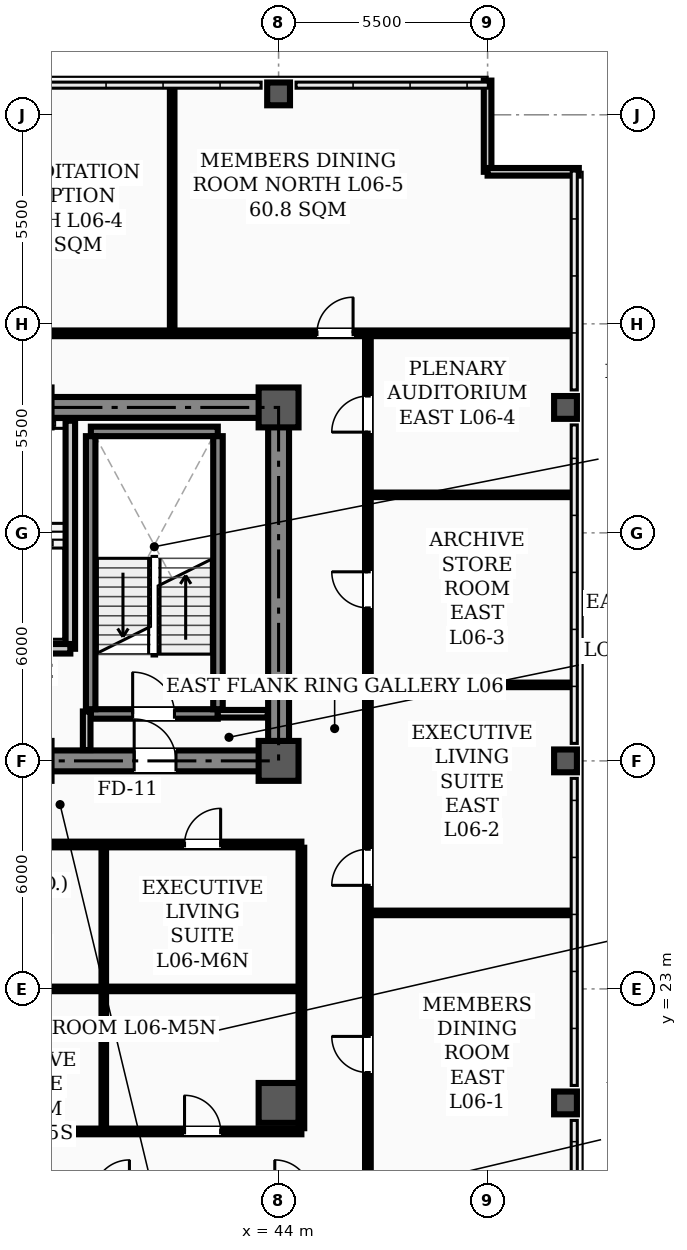
"""IFC4 building model, lengths in metres.
Left out: names, types, materials, properties, quantities, classifications, styles, units other than length and angle.
Written with IfcOpenShell. Run it as: python <this file> out.ifc"""

import sys

from ifc_helpers import new_model, si_unit, direction, frame, frame_2d, origin, origin_2d, place, context, subcontext, project, spatial, rectangle, hollow_rectangle, extrude, element, fill, save


model = new_model("IFC4")
c1 = context("Model", 3, precision=1e-05, world=origin(), true_north=direction((0.0, 1.0)))
c2 = subcontext(c1, "Body", "Model", "MODEL_VIEW")
j1 = project(units=[si_unit("LENGTHUNIT", "METRE"), si_unit("PLANEANGLEUNIT", "RADIAN")], contexts=[c1])
p1 = place(None, origin())
s1 = spatial("IfcSite", under=j1, at=p1, CompositionType="ELEMENT")
p2 = place(p1, origin())
s2 = spatial("IfcBuilding", under=s1, at=p2, CompositionType="ELEMENT")
p3 = place(p2, frame((0.0, 0.0, 26.5)))
s3 = spatial("IfcBuildingStorey", under=s2, at=p3, CompositionType="ELEMENT", Elevation=26.5)
for number, where, z_axis, x_axis in (
    (1, (44.0, 29.0, 0.0), (0.0, 0.0, 1.0), (1.0, 0.0, 0.0)),
    (2, (44.0, 38.3, 0.0), (0.0, 0.0, 1.0), (1.0, 0.0, 0.0)),
    (3, (44.0, 20.0, 0.0), (0.0, 0.0, 1.0), (1.0, 0.0, 0.0)),
):
    element("IfcColumn", number, at=place(p3, frame(where, z_axis=z_axis, x_axis=x_axis)), inside=s3, PredefinedType="COLUMN", context=c2, shape_type="SweptSolid", body=[
        extrude(hollow_rectangle(XDim=1.05, YDim=1.05, WallThickness=0.038, InnerFilletRadius=0.019, OuterFilletRadius=0.057, at=origin_2d()), origin(), (0.0, 0.0, 1.0), 3.9),
    ])
for number, where, z_axis, x_axis in (
    (4, (44.0, 46.55, 0.0), (0.0, 0.0, 1.0), (1.0, 0.0, 0.0)),
    (5, (51.55, 20.0, 0.0), (0.0, 0.0, 1.0), (1.0, 0.0, 0.0)),
    (6, (51.55, 29.0, 0.0), (0.0, 0.0, 1.0), (1.0, 0.0, 0.0)),
    (7, (51.55, 38.3, 0.0), (0.0, 0.0, 1.0), (1.0, 0.0, 0.0)),
):
    element("IfcColumn", number, at=place(p3, frame(where, z_axis=z_axis, x_axis=x_axis)), inside=s3, PredefinedType="COLUMN", context=c2, shape_type="SweptSolid", body=[
        extrude(hollow_rectangle(XDim=0.6, YDim=0.6, WallThickness=0.026, InnerFilletRadius=0.013, OuterFilletRadius=0.039, at=origin_2d()), origin(), (0.0, 0.0, 1.0), 3.9),
    ])
for number, where, z_axis, x_axis in (
    (8, (49.5, 46.9, 0.0), (0.0, 0.0, 1.0), (0.0, -1.0, 0.0)),
    (9, (49.5, 44.5, 0.0), (0.0, 0.0, 1.0), (1.0, 0.0, 0.0)),
):
    element("IfcWall", number, at=place(p3, frame(where, z_axis=z_axis, x_axis=x_axis)), inside=s3, PredefinedType="PARAPET", context=c2, shape_type="SweptSolid", body=[
        extrude(rectangle(XDim=2.4, YDim=0.2, at=frame_2d((1.2, 0.0))), origin(), (0.0, 0.0, 1.0), 1.2),
    ])
p4 = place(p3, frame((13.5, 29.0, 0.0), z_axis=(0.0, 0.0, 1.0), x_axis=(1.0, 0.0, 0.0)))
e10 = element("IfcWall", 10, at=p4, inside=s3, PredefinedType="SHEAR", context=c2, shape_type="SweptSolid", body=[
    extrude(rectangle(XDim=30.5, YDim=0.55, at=frame_2d((15.25, 0.0))), origin(), (0.0, 0.0, 1.0), 3.72),
])
p5 = place(p4, frame((1.75, 0.0, 0.0)))
e11 = element("IfcOpeningElement", 11, at=p5, cuts=e10, PredefinedType="OPENING", context=c2, shape_type="SweptSolid", body=[
    extrude(rectangle(XDim=1.1, YDim=2.08, at=frame_2d((0.55, 1.04))), frame((0.0, 0.285, 0.0), z_axis=(0.0, -1.0, 0.0), x_axis=(1.0, 0.0, 0.0)), (0.0, 0.0, 1.0), 0.57),
])
p6 = place(p4, frame((26.7, 0.0, 0.0)))
e12 = element("IfcOpeningElement", 12, at=p6, cuts=e10, PredefinedType="OPENING", context=c2, shape_type="SweptSolid", body=[
    extrude(rectangle(XDim=1.1, YDim=2.08, at=frame_2d((0.55, 1.04))), frame((0.0, 0.285, 0.0), z_axis=(0.0, -1.0, 0.0), x_axis=(1.0, 0.0, 0.0)), (0.0, 0.0, 1.0), 0.57),
])
p7 = place(p4, frame((6.8, 0.0, 0.0)))
e13 = element("IfcOpeningElement", 13, at=p7, cuts=e10, PredefinedType="OPENING", context=c2, shape_type="SweptSolid", body=[
    extrude(rectangle(XDim=1.1, YDim=2.08, at=frame_2d((0.55, 1.04))), frame((0.0, 0.285, 0.0), z_axis=(0.0, -1.0, 0.0), x_axis=(1.0, 0.0, 0.0)), (0.0, 0.0, 1.0), 0.57),
])
p8 = place(p4, frame((13.2, 0.0, 0.0)))
e14 = element("IfcOpeningElement", 14, at=p8, cuts=e10, PredefinedType="OPENING", context=c2, shape_type="SweptSolid", body=[
    extrude(rectangle(XDim=1.6, YDim=2.08, at=frame_2d((0.8, 1.04))), frame((0.0, 0.285, 0.0), z_axis=(0.0, -1.0, 0.0), x_axis=(1.0, 0.0, 0.0)), (0.0, 0.0, 1.0), 0.57),
])
p9 = place(p4, frame((20.525, 0.0, 0.0)))
e15 = element("IfcOpeningElement", 15, at=p9, cuts=e10, PredefinedType="OPENING", context=c2, shape_type="SweptSolid", body=[
    extrude(rectangle(XDim=0.95, YDim=2.08, at=frame_2d((0.475, 1.04))), frame((0.0, 0.285, 0.0), z_axis=(0.0, -1.0, 0.0), x_axis=(1.0, 0.0, 0.0)), (0.0, 0.0, 1.0), 0.57),
])
p10 = place(p3, frame((13.5, 38.3, 0.0), z_axis=(0.0, 0.0, 1.0), x_axis=(1.0, 0.0, 0.0)))
e16 = element("IfcWall", 16, at=p10, inside=s3, PredefinedType="SHEAR", context=c2, shape_type="SweptSolid", body=[
    extrude(rectangle(XDim=30.5, YDim=0.55, at=frame_2d((15.25, 0.0))), origin(), (0.0, 0.0, 1.0), 3.72),
])
p11 = place(p3, frame((44.0, 29.35, 0.0), z_axis=(0.0, 0.0, 1.0), x_axis=(0.0, 1.0, 0.0)))
e17 = element("IfcWall", 17, at=p11, inside=s3, PredefinedType="SHEAR", context=c2, shape_type="SweptSolid", body=[
    extrude(rectangle(XDim=8.6, YDim=0.55, at=frame_2d((4.3, 0.0))), origin(), (0.0, 0.0, 1.0), 3.72),
])
p12 = place(p3, frame((39.06, 30.235, 0.0), z_axis=(0.0, 0.0, 1.0), x_axis=(1.0, 0.0, 0.0)))
e18 = element("IfcWall", 18, at=p12, inside=s3, PredefinedType="STANDARD", context=c2, shape_type="SweptSolid", body=[
    extrude(rectangle(XDim=3.34, YDim=0.25, at=frame_2d((1.67, 0.0))), origin(), (0.0, 0.0, 1.0), 3.72),
])
p13 = place(p12, frame((1.1, 0.0, 0.0)))
e19 = element("IfcOpeningElement", 19, at=p13, cuts=e18, PredefinedType="OPENING", context=c2, shape_type="SweptSolid", body=[
    extrude(rectangle(XDim=1.1, YDim=2.08, at=frame_2d((0.55, 1.04))), frame((0.0, 0.135, 0.0), z_axis=(0.0, -1.0, 0.0), x_axis=(1.0, 0.0, 0.0)), (0.0, 0.0, 1.0), 0.27),
])
p14 = place(p3, frame((39.06, 37.669, 0.0), z_axis=(0.0, 0.0, 1.0), x_axis=(1.0, 0.0, 0.0)))
e20 = element("IfcWall", 20, at=p14, inside=s3, PredefinedType="STANDARD", context=c2, shape_type="SweptSolid", body=[
    extrude(rectangle(XDim=3.34, YDim=0.25, at=frame_2d((1.67, 0.0))), origin(), (0.0, 0.0, 1.0), 3.72),
])
for number, where, z_axis, x_axis in (
    (21, (39.055, 30.36, 0.0), (0.0, 0.0, 1.0), (0.0, 1.0, 0.0)),
    (22, (42.405, 30.36, 0.0), (0.0, 0.0, 1.0), (0.0, 1.0, 0.0)),
):
    element("IfcWall", number, at=place(p3, frame(where, z_axis=z_axis, x_axis=x_axis)), inside=s3, PredefinedType="STANDARD", context=c2, shape_type="SweptSolid", body=[
        extrude(rectangle(XDim=7.184, YDim=0.25, at=frame_2d((3.592, 0.0))), origin(), (0.0, 0.0, 1.0), 3.72),
    ])
p15 = place(p3, frame((38.52, 31.95, 0.0), z_axis=(0.0, 0.0, 1.0), x_axis=(0.0, 1.0, 0.0)))
e23 = element("IfcWall", 23, at=p15, inside=s3, PredefinedType="STANDARD", context=c2, shape_type="SweptSolid", body=[
    extrude(rectangle(XDim=6.0, YDim=0.25, at=frame_2d((3.0, 0.0))), origin(), (0.0, 0.0, 1.0), 3.3),
])
p16 = place(p3, frame((36.62, 31.95, 0.0), z_axis=(0.0, 0.0, 1.0), x_axis=(1.0, 0.0, 0.0)))
e24 = element("IfcWall", 24, at=p16, inside=s3, PredefinedType="STANDARD", context=c2, shape_type="SweptSolid", body=[
    extrude(rectangle(XDim=1.9, YDim=0.25, at=frame_2d((0.95, 0.0))), origin(), (0.0, 0.0, 1.0), 3.48),
])
p17 = place(p3, frame((42.4, 30.24, 0.0), z_axis=(0.0, 0.0, 1.0), x_axis=(1.0, 0.0, 0.0)))
e25 = element("IfcWall", 25, at=p17, inside=s3, PredefinedType="STANDARD", context=c2, shape_type="SweptSolid", body=[
    extrude(rectangle(XDim=1.315, YDim=0.2, at=frame_2d((0.658, 0.0))), origin(), (0.0, 0.0, 1.0), 3.1),
])
p18 = place(p3, frame((12.9, 26.8, 0.0), z_axis=(0.0, 0.0, 1.0), x_axis=(1.0, 0.0, 0.0)))
e26 = element("IfcWall", 26, at=p18, inside=s3, PredefinedType="PARTITIONING", context=c2, shape_type="SweptSolid", body=[
    extrude(rectangle(XDim=31.7, YDim=0.15, at=frame_2d((15.85, 0.0))), origin(), (0.0, 0.0, 1.0), 3.1),
])
p19 = place(p18, frame((13.6, 0.0, 0.0)))
e27 = element("IfcOpeningElement", 27, at=p19, cuts=e26, PredefinedType="OPENING", context=c2, shape_type="SweptSolid", body=[
    extrude(rectangle(XDim=1.6, YDim=2.08, at=frame_2d((0.8, 1.04))), frame((0.0, 0.085, 0.0), z_axis=(0.0, -1.0, 0.0), x_axis=(1.0, 0.0, 0.0)), (0.0, 0.0, 1.0), 0.17),
])
p20 = place(p18, frame((1.775, 0.0, 0.0)))
e28 = element("IfcOpeningElement", 28, at=p20, cuts=e26, PredefinedType="OPENING", context=c2, shape_type="SweptSolid", body=[
    extrude(rectangle(XDim=0.95, YDim=2.08, at=frame_2d((0.475, 1.04))), frame((0.0, 0.085, 0.0), z_axis=(0.0, -1.0, 0.0), x_axis=(1.0, 0.0, 0.0)), (0.0, 0.0, 1.0), 0.17),
])
p21 = place(p18, frame((6.225, 0.0, 0.0)))
e29 = element("IfcOpeningElement", 29, at=p21, cuts=e26, PredefinedType="OPENING", context=c2, shape_type="SweptSolid", body=[
    extrude(rectangle(XDim=0.95, YDim=2.08, at=frame_2d((0.475, 1.04))), frame((0.0, 0.085, 0.0), z_axis=(0.0, -1.0, 0.0), x_axis=(1.0, 0.0, 0.0)), (0.0, 0.0, 1.0), 0.17),
])
p22 = place(p18, frame((10.625, 0.0, 0.0)))
e30 = element("IfcOpeningElement", 30, at=p22, cuts=e26, PredefinedType="OPENING", context=c2, shape_type="SweptSolid", body=[
    extrude(rectangle(XDim=0.95, YDim=2.08, at=frame_2d((0.475, 1.04))), frame((0.0, 0.085, 0.0), z_axis=(0.0, -1.0, 0.0), x_axis=(1.0, 0.0, 0.0)), (0.0, 0.0, 1.0), 0.17),
])
p23 = place(p18, frame((16.075, 0.0, 0.0)))
e31 = element("IfcOpeningElement", 31, at=p23, cuts=e26, PredefinedType="OPENING", context=c2, shape_type="SweptSolid", body=[
    extrude(rectangle(XDim=0.95, YDim=2.08, at=frame_2d((0.475, 1.04))), frame((0.0, 0.085, 0.0), z_axis=(0.0, -1.0, 0.0), x_axis=(1.0, 0.0, 0.0)), (0.0, 0.0, 1.0), 0.17),
])
p24 = place(p18, frame((21.925, 0.0, 0.0)))
e32 = element("IfcOpeningElement", 32, at=p24, cuts=e26, PredefinedType="OPENING", context=c2, shape_type="SweptSolid", body=[
    extrude(rectangle(XDim=0.95, YDim=2.08, at=frame_2d((0.475, 1.04))), frame((0.0, 0.085, 0.0), z_axis=(0.0, -1.0, 0.0), x_axis=(1.0, 0.0, 0.0)), (0.0, 0.0, 1.0), 0.17),
])
p25 = place(p18, frame((28.625, 0.0, 0.0)))
e33 = element("IfcOpeningElement", 33, at=p25, cuts=e26, PredefinedType="OPENING", context=c2, shape_type="SweptSolid", body=[
    extrude(rectangle(XDim=0.95, YDim=2.08, at=frame_2d((0.475, 1.04))), frame((0.0, 0.085, 0.0), z_axis=(0.0, -1.0, 0.0), x_axis=(1.0, 0.0, 0.0)), (0.0, 0.0, 1.0), 0.17),
])
p26 = place(p3, frame((28.4, 19.25, 0.0), z_axis=(0.0, 0.0, 1.0), x_axis=(1.0, 0.0, 0.0)))
e34 = element("IfcWall", 34, at=p26, inside=s3, PredefinedType="PARTITIONING", context=c2, shape_type="SweptSolid", body=[
    extrude(rectangle(XDim=16.2, YDim=0.15, at=frame_2d((8.1, 0.0))), origin(), (0.0, 0.0, 1.0), 3.1),
])
p27 = place(p26, frame((0.575, 0.0, 0.0)))
e35 = element("IfcOpeningElement", 35, at=p27, cuts=e34, PredefinedType="OPENING", context=c2, shape_type="SweptSolid", body=[
    extrude(rectangle(XDim=0.95, YDim=2.08, at=frame_2d((0.475, 1.04))), frame((0.0, 0.085, 0.0), z_axis=(0.0, -1.0, 0.0), x_axis=(1.0, 0.0, 0.0)), (0.0, 0.0, 1.0), 0.17),
])
p28 = place(p26, frame((6.425, 0.0, 0.0)))
e36 = element("IfcOpeningElement", 36, at=p28, cuts=e34, PredefinedType="OPENING", context=c2, shape_type="SweptSolid", body=[
    extrude(rectangle(XDim=0.95, YDim=2.08, at=frame_2d((0.475, 1.04))), frame((0.0, 0.085, 0.0), z_axis=(0.0, -1.0, 0.0), x_axis=(1.0, 0.0, 0.0)), (0.0, 0.0, 1.0), 0.17),
])
p29 = place(p26, frame((13.125, 0.0, 0.0)))
e37 = element("IfcOpeningElement", 37, at=p29, cuts=e34, PredefinedType="OPENING", context=c2, shape_type="SweptSolid", body=[
    extrude(rectangle(XDim=0.95, YDim=2.08, at=frame_2d((0.475, 1.04))), frame((0.0, 0.085, 0.0), z_axis=(0.0, -1.0, 0.0), x_axis=(1.0, 0.0, 0.0)), (0.0, 0.0, 1.0), 0.17),
])
p30 = place(p3, frame((33.0, 23.0, 0.0), z_axis=(0.0, 0.0, 1.0), x_axis=(1.0, 0.0, 0.0)))
e38 = element("IfcWall", 38, at=p30, inside=s3, PredefinedType="PARTITIONING", context=c2, shape_type="SweptSolid", body=[
    extrude(rectangle(XDim=6.4, YDim=0.12, at=frame_2d((3.2, 0.0))), origin(), (0.0, 0.0, 1.0), 3.1),
])
p31 = place(p3, frame((39.4, 23.0, 0.0), z_axis=(0.0, 0.0, 1.0), x_axis=(1.0, 0.0, 0.0)))
e39 = element("IfcWall", 39, at=p31, inside=s3, PredefinedType="PARTITIONING", context=c2, shape_type="SweptSolid", body=[
    extrude(rectangle(XDim=5.2, YDim=0.12, at=frame_2d((2.6, 0.0))), origin(), (0.0, 0.0, 1.0), 3.1),
])
for number, where, z_axis, x_axis in (
    (40, (46.35, 25.0, 0.0), (0.0, 0.0, 1.0), (1.0, 0.0, 0.0)),
    (41, (46.35, 31.0, 0.0), (0.0, 0.0, 1.0), (1.0, 0.0, 0.0)),
    (42, (46.35, 36.0, 0.0), (0.0, 0.0, 1.0), (1.0, 0.0, 0.0)),
):
    element("IfcWall", number, at=place(p3, frame(where, z_axis=z_axis, x_axis=x_axis)), inside=s3, PredefinedType="PARTITIONING", context=c2, shape_type="SweptSolid", body=[
        extrude(rectangle(XDim=5.34, YDim=0.12, at=frame_2d((2.67, 0.0))), origin(), (0.0, 0.0, 1.0), 3.212),
    ])
p32 = place(p3, frame((2.31, 40.25, 0.0), z_axis=(0.0, 0.0, 1.0), x_axis=(1.0, 0.0, 0.0)))
e43 = element("IfcWall", 43, at=p32, inside=s3, PredefinedType="PARTITIONING", context=c2, shape_type="SweptSolid", body=[
    extrude(rectangle(XDim=49.38, YDim=0.15, at=frame_2d((24.69, 0.0))), origin(), (0.0, 0.0, 1.0), 3.1),
])
p33 = place(p32, frame((9.23, 0.0, 0.0)))
e44 = element("IfcOpeningElement", 44, at=p33, cuts=e43, PredefinedType="OPENING", context=c2, shape_type="SweptSolid", body=[
    extrude(rectangle(XDim=0.95, YDim=2.08, at=frame_2d((0.475, 1.04))), frame((0.0, 0.085, 0.0), z_axis=(0.0, -1.0, 0.0), x_axis=(1.0, 0.0, 0.0)), (0.0, 0.0, 1.0), 0.17),
])
p34 = place(p32, frame((18.715, 0.0, 0.0)))
e45 = element("IfcOpeningElement", 45, at=p34, cuts=e43, PredefinedType="OPENING", context=c2, shape_type="SweptSolid", body=[
    extrude(rectangle(XDim=0.95, YDim=2.08, at=frame_2d((0.475, 1.04))), frame((0.0, 0.085, 0.0), z_axis=(0.0, -1.0, 0.0), x_axis=(1.0, 0.0, 0.0)), (0.0, 0.0, 1.0), 0.17),
])
p35 = place(p32, frame((26.715, 0.0, 0.0)))
e46 = element("IfcOpeningElement", 46, at=p35, cuts=e43, PredefinedType="OPENING", context=c2, shape_type="SweptSolid", body=[
    extrude(rectangle(XDim=0.95, YDim=2.08, at=frame_2d((0.475, 1.04))), frame((0.0, 0.085, 0.0), z_axis=(0.0, -1.0, 0.0), x_axis=(1.0, 0.0, 0.0)), (0.0, 0.0, 1.0), 0.17),
])
p36 = place(p32, frame((31.765, 0.0, 0.0)))
e47 = element("IfcOpeningElement", 47, at=p36, cuts=e43, PredefinedType="OPENING", context=c2, shape_type="SweptSolid", body=[
    extrude(rectangle(XDim=0.95, YDim=2.08, at=frame_2d((0.475, 1.04))), frame((0.0, 0.085, 0.0), z_axis=(0.0, -1.0, 0.0), x_axis=(1.0, 0.0, 0.0)), (0.0, 0.0, 1.0), 0.17),
])
p37 = place(p32, frame((42.7, 0.0, 0.0)))
e48 = element("IfcOpeningElement", 48, at=p37, cuts=e43, PredefinedType="OPENING", context=c2, shape_type="SweptSolid", body=[
    extrude(rectangle(XDim=0.95, YDim=2.08, at=frame_2d((0.475, 1.04))), frame((0.0, 0.085, 0.0), z_axis=(0.0, -1.0, 0.0), x_axis=(1.0, 0.0, 0.0)), (0.0, 0.0, 1.0), 0.17),
])
p38 = place(p3, frame((38.95, 29.285, 0.0), z_axis=(0.0, 0.0, 1.0), x_axis=(0.0, 1.0, 0.0)))
e49 = element("IfcWall", 49, at=p38, inside=s3, PredefinedType="STANDARD", context=c2, shape_type="SweptSolid", body=[
    extrude(rectangle(XDim=1.015, YDim=0.2, at=frame_2d((0.508, 0.0))), origin(), (0.0, 0.0, 1.0), 3.3),
])
p39 = place(p3, frame((46.35, 17.635, 0.0), z_axis=(0.0, 0.0, 1.0), x_axis=(0.0, 1.0, 0.0)))
e50 = element("IfcWall", 50, at=p39, inside=s3, PredefinedType="PARTITIONING", context=c2, shape_type="SweptSolid", body=[
    extrude(rectangle(XDim=22.53, YDim=0.15, at=frame_2d((11.265, 0.0))), origin(), (0.0, 0.0, 1.0), 3.0),
])
p40 = place(p39, frame((3.165, 0.0, 0.0)))
e51 = element("IfcOpeningElement", 51, at=p40, cuts=e50, PredefinedType="OPENING", context=c2, shape_type="SweptSolid", body=[
    extrude(rectangle(XDim=0.95, YDim=2.08, at=frame_2d((0.475, 1.04))), frame((0.0, 0.085, 0.0), z_axis=(0.0, -1.0, 0.0), x_axis=(1.0, 0.0, 0.0)), (0.0, 0.0, 1.0), 0.17),
])
p41 = place(p39, frame((8.09, 0.0, 0.0)))
e52 = element("IfcOpeningElement", 52, at=p41, cuts=e50, PredefinedType="OPENING", context=c2, shape_type="SweptSolid", body=[
    extrude(rectangle(XDim=0.95, YDim=2.08, at=frame_2d((0.475, 1.04))), frame((0.0, 0.085, 0.0), z_axis=(0.0, -1.0, 0.0), x_axis=(1.0, 0.0, 0.0)), (0.0, 0.0, 1.0), 0.17),
])
p42 = place(p39, frame((15.39, 0.0, 0.0)))
e53 = element("IfcOpeningElement", 53, at=p42, cuts=e50, PredefinedType="OPENING", context=c2, shape_type="SweptSolid", body=[
    extrude(rectangle(XDim=0.95, YDim=2.08, at=frame_2d((0.475, 1.04))), frame((0.0, 0.085, 0.0), z_axis=(0.0, -1.0, 0.0), x_axis=(1.0, 0.0, 0.0)), (0.0, 0.0, 1.0), 0.17),
])
p43 = place(p39, frame((20.015, 0.0, 0.0)))
e54 = element("IfcOpeningElement", 54, at=p43, cuts=e50, PredefinedType="OPENING", context=c2, shape_type="SweptSolid", body=[
    extrude(rectangle(XDim=0.95, YDim=2.08, at=frame_2d((0.475, 1.04))), frame((0.0, 0.085, 0.0), z_axis=(0.0, -1.0, 0.0), x_axis=(1.0, 0.0, 0.0)), (0.0, 0.0, 1.0), 0.17),
])
p44 = place(p3, frame((44.6, 19.335, 0.0), z_axis=(0.0, 0.0, 1.0), x_axis=(0.0, 1.0, 0.0)))
e55 = element("IfcWall", 55, at=p44, inside=s3, PredefinedType="PARTITIONING", context=c2, shape_type="SweptSolid", body=[
    extrude(rectangle(XDim=7.38, YDim=0.15, at=frame_2d((3.69, 0.0))), origin(), (0.0, 0.0, 1.0), 3.0),
])
p45 = place(p3, frame((39.4, 19.335, 0.0), z_axis=(0.0, 0.0, 1.0), x_axis=(0.0, 1.0, 0.0)))
e56 = element("IfcWall", 56, at=p45, inside=s3, PredefinedType="PARTITIONING", context=c2, shape_type="SweptSolid", body=[
    extrude(rectangle(XDim=7.38, YDim=0.12, at=frame_2d((3.69, 0.0))), origin(), (0.0, 0.0, 1.0), 3.0),
])
p46 = place(p3, frame((41.2, 40.335, 0.0), z_axis=(0.0, 0.0, 1.0), x_axis=(0.0, 1.0, 0.0)))
e57 = element("IfcWall", 57, at=p46, inside=s3, PredefinedType="PARTITIONING", context=c2, shape_type="SweptSolid", body=[
    extrude(rectangle(XDim=6.355, YDim=0.12, at=frame_2d((3.177, 0.0))), origin(), (0.0, 0.0, 1.0), 3.212),
])
p47 = place(p13, origin())
e58 = element("IfcDoor", 58, at=p47, inside=s3, OperationType="SINGLE_SWING_LEFT", PredefinedType="DOOR", context=c2, shape_type="SweptSolid", body=[
    extrude(rectangle(XDim=1.1, YDim=2.08, at=frame_2d((0.55, 1.04))), frame((0.0, 0.025, 0.0), z_axis=(0.0, -1.0, 0.0), x_axis=(1.0, 0.0, 0.0)), (0.0, 0.0, 1.0), 0.05),
])
fill(e19, e58)
p48 = place(p6, origin())
e59 = element("IfcDoor", 59, at=p48, inside=s3, OperationType="SINGLE_SWING_LEFT", PredefinedType="DOOR", context=c2, shape_type="SweptSolid", body=[
    extrude(rectangle(XDim=1.1, YDim=2.08, at=frame_2d((0.55, 1.04))), frame((0.0, 0.025, 0.0), z_axis=(0.0, -1.0, 0.0), x_axis=(1.0, 0.0, 0.0)), (0.0, 0.0, 1.0), 0.05),
])
fill(e12, e59)
p49 = place(p25, origin())
e60 = element("IfcDoor", 60, at=p49, inside=s3, OperationType="SINGLE_SWING_RIGHT", PredefinedType="DOOR", context=c2, shape_type="SweptSolid", body=[
    extrude(rectangle(XDim=0.95, YDim=2.08, at=frame_2d((0.475, 1.04))), frame((0.0, 0.025, 0.0), z_axis=(0.0, -1.0, 0.0), x_axis=(1.0, 0.0, 0.0)), (0.0, 0.0, 1.0), 0.05),
])
fill(e33, e60)
p50 = place(p29, origin())
e61 = element("IfcDoor", 61, at=p50, inside=s3, OperationType="SINGLE_SWING_LEFT", PredefinedType="DOOR", context=c2, shape_type="SweptSolid", body=[
    extrude(rectangle(XDim=0.95, YDim=2.08, at=frame_2d((0.475, 1.04))), frame((0.0, 0.025, 0.0), z_axis=(0.0, -1.0, 0.0), x_axis=(1.0, 0.0, 0.0)), (0.0, 0.0, 1.0), 0.05),
])
fill(e37, e61)
p51 = place(p40, origin())
e62 = element("IfcDoor", 62, at=p51, inside=s3, OperationType="SINGLE_SWING_RIGHT", PredefinedType="DOOR", context=c2, shape_type="SweptSolid", body=[
    extrude(rectangle(XDim=0.95, YDim=2.08, at=frame_2d((0.475, 1.04))), frame((0.0, 0.025, 0.0), z_axis=(0.0, -1.0, 0.0), x_axis=(1.0, 0.0, 0.0)), (0.0, 0.0, 1.0), 0.05),
])
fill(e51, e62)
p52 = place(p41, origin())
e63 = element("IfcDoor", 63, at=p52, inside=s3, OperationType="SINGLE_SWING_LEFT", PredefinedType="DOOR", context=c2, shape_type="SweptSolid", body=[
    extrude(rectangle(XDim=0.95, YDim=2.08, at=frame_2d((0.475, 1.04))), frame((0.0, 0.025, 0.0), z_axis=(0.0, -1.0, 0.0), x_axis=(1.0, 0.0, 0.0)), (0.0, 0.0, 1.0), 0.05),
])
fill(e52, e63)
p53 = place(p42, origin())
e64 = element("IfcDoor", 64, at=p53, inside=s3, OperationType="SINGLE_SWING_RIGHT", PredefinedType="DOOR", context=c2, shape_type="SweptSolid", body=[
    extrude(rectangle(XDim=0.95, YDim=2.08, at=frame_2d((0.475, 1.04))), frame((0.0, 0.025, 0.0), z_axis=(0.0, -1.0, 0.0), x_axis=(1.0, 0.0, 0.0)), (0.0, 0.0, 1.0), 0.05),
])
fill(e53, e64)
p54 = place(p43, origin())
e65 = element("IfcDoor", 65, at=p54, inside=s3, OperationType="SINGLE_SWING_LEFT", PredefinedType="DOOR", context=c2, shape_type="SweptSolid", body=[
    extrude(rectangle(XDim=0.95, YDim=2.08, at=frame_2d((0.475, 1.04))), frame((0.0, 0.025, 0.0), z_axis=(0.0, -1.0, 0.0), x_axis=(1.0, 0.0, 0.0)), (0.0, 0.0, 1.0), 0.05),
])
fill(e54, e65)
p55 = place(p37, origin())
e66 = element("IfcDoor", 66, at=p55, inside=s3, OperationType="SINGLE_SWING_RIGHT", PredefinedType="DOOR", context=c2, shape_type="SweptSolid", body=[
    extrude(rectangle(XDim=0.95, YDim=2.08, at=frame_2d((0.475, 1.04))), frame((0.0, 0.025, 0.0), z_axis=(0.0, -1.0, 0.0), x_axis=(1.0, 0.0, 0.0)), (0.0, 0.0, 1.0), 0.05),
])
fill(e48, e66)
save(model, sys.argv[1])
